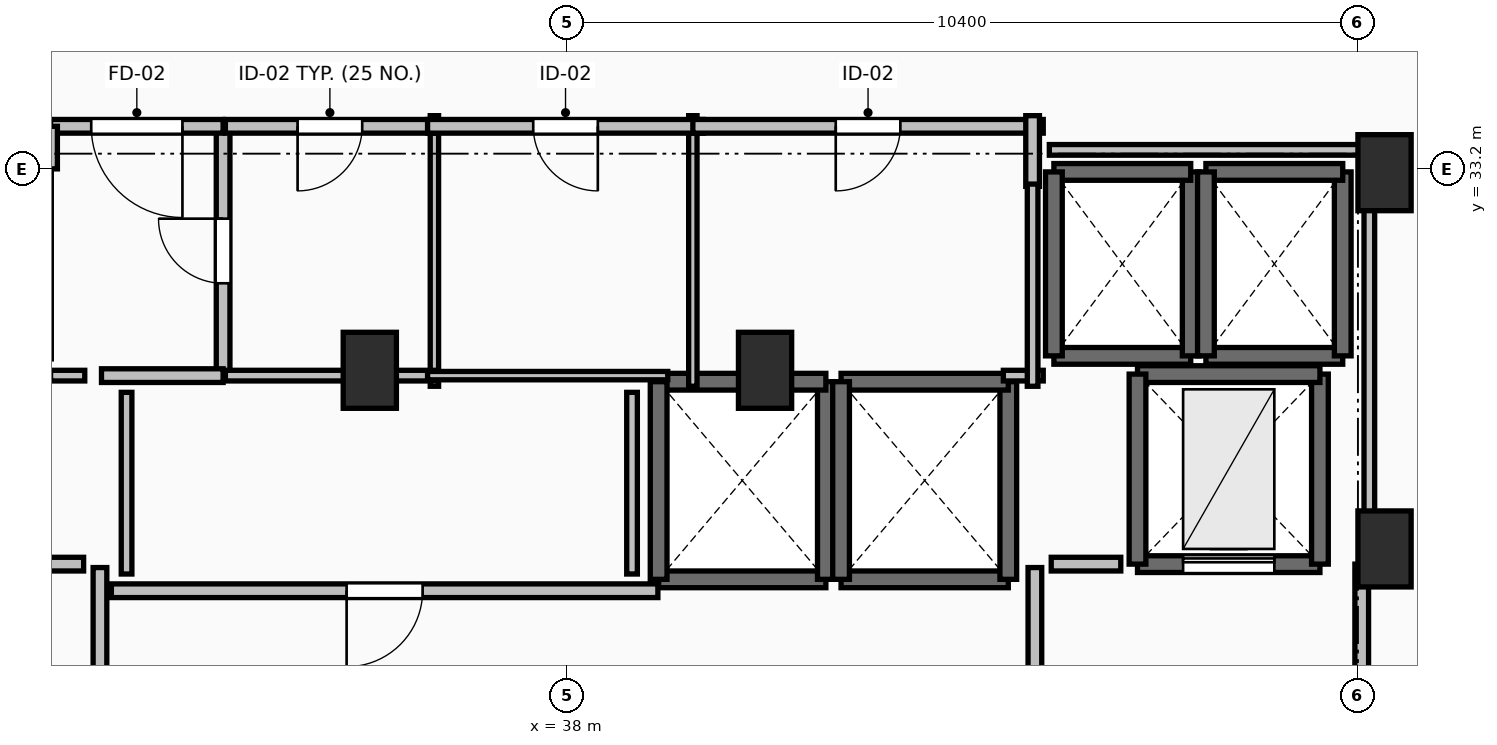
"""IFC4 building model, lengths in metres.
Left out: names, types, materials, properties, quantities, classifications, styles, units other than length and angle.
Written with IfcOpenShell. Run it as: python <this file> out.ifc"""

import sys

from ifc_helpers import new_model, si_unit, direction, frame, frame_2d, origin, origin_2d, place, context, subcontext, project, spatial, rectangle, extrude, element, fill, save


model = new_model("IFC4")
c1 = context("Model", 3, precision=1e-05, world=origin(), true_north=direction((0.0, 1.0)))
c2 = subcontext(c1, "Body", "Model", "MODEL_VIEW")
j1 = project(units=[si_unit("LENGTHUNIT", "METRE"), si_unit("PLANEANGLEUNIT", "RADIAN")], contexts=[c1])
p1 = place(None, origin())
s1 = spatial("IfcSite", under=j1, at=p1, CompositionType="ELEMENT")
p2 = place(p1, origin())
s2 = spatial("IfcBuilding", under=s1, at=p2, CompositionType="ELEMENT")
p3 = place(p2, frame((0.0, 0.0, 193.1)))
s3 = spatial("IfcBuildingStorey", under=s2, at=p3, CompositionType="ELEMENT", Elevation=193.1)
for number, where, z_axis, x_axis in (
    (1, (48.75, 33.15, 0.0), (0.0, 0.0, 1.0), (1.0, 0.0, 0.0)),
    (2, (48.75, 28.2, 0.0), (0.0, 0.0, 1.0), (1.0, 0.0, 0.0)),
    (3, (35.4, 30.55, 0.0), (0.0, 0.0, 1.0), (1.0, 0.0, 0.0)),
    (4, (40.6, 30.55, 0.0), (0.0, 0.0, 1.0), (1.0, 0.0, 0.0)),
):
    element("IfcColumn", number, at=place(p3, frame(where, z_axis=z_axis, x_axis=x_axis)), inside=s3, PredefinedType="PILASTER", context=c2, shape_type="SweptSolid", body=[
        extrude(rectangle(XDim=0.7, YDim=1.0, at=origin_2d()), origin(), (0.0, 0.0, 1.0), 3.5),
    ])
p4 = place(p3, frame((39.2, 27.8, 0.0), z_axis=(0.0, 0.0, 1.0), x_axis=(1.0, 0.0, 0.0)))
e5 = element("IfcWall", 5, at=p4, inside=s3, PredefinedType="SOLIDWALL", context=c2, shape_type="SweptSolid", body=[
    extrude(rectangle(XDim=2.2, YDim=0.22, at=frame_2d((1.1, 0.0))), origin(), (0.0, 0.0, 1.0), 3.24),
])
p5 = place(p3, frame((41.4, 27.8, 0.0), z_axis=(0.0, 0.0, 1.0), x_axis=(0.0, 1.0, 0.0)))
e6 = element("IfcWall", 6, at=p5, inside=s3, PredefinedType="SOLIDWALL", context=c2, shape_type="SweptSolid", body=[
    extrude(rectangle(XDim=2.6, YDim=0.22, at=frame_2d((1.3, 0.0))), origin(), (0.0, 0.0, 1.0), 3.24),
])
p6 = place(p3, frame((41.4, 30.4, 0.0), z_axis=(0.0, 0.0, 1.0), x_axis=(-1.0, 0.0, 0.0)))
e7 = element("IfcWall", 7, at=p6, inside=s3, PredefinedType="SOLIDWALL", context=c2, shape_type="SweptSolid", body=[
    extrude(rectangle(XDim=2.2, YDim=0.22, at=frame_2d((1.1, 0.0))), origin(), (0.0, 0.0, 1.0), 3.24),
])
p7 = place(p3, frame((39.2, 30.4, 0.0), z_axis=(0.0, 0.0, 1.0), x_axis=(0.0, -1.0, 0.0)))
e8 = element("IfcWall", 8, at=p7, inside=s3, PredefinedType="SOLIDWALL", context=c2, shape_type="SweptSolid", body=[
    extrude(rectangle(XDim=2.6, YDim=0.22, at=frame_2d((1.3, 0.0))), origin(), (0.0, 0.0, 1.0), 3.24),
])
p8 = place(p3, frame((41.6, 27.8, 0.0), z_axis=(0.0, 0.0, 1.0), x_axis=(1.0, 0.0, 0.0)))
e9 = element("IfcWall", 9, at=p8, inside=s3, PredefinedType="SOLIDWALL", context=c2, shape_type="SweptSolid", body=[
    extrude(rectangle(XDim=2.2, YDim=0.22, at=frame_2d((1.1, 0.0))), origin(), (0.0, 0.0, 1.0), 3.24),
])
p9 = place(p3, frame((43.8, 27.8, 0.0), z_axis=(0.0, 0.0, 1.0), x_axis=(0.0, 1.0, 0.0)))
e10 = element("IfcWall", 10, at=p9, inside=s3, PredefinedType="SOLIDWALL", context=c2, shape_type="SweptSolid", body=[
    extrude(rectangle(XDim=2.6, YDim=0.22, at=frame_2d((1.3, 0.0))), origin(), (0.0, 0.0, 1.0), 3.24),
])
p10 = place(p3, frame((43.8, 30.4, 0.0), z_axis=(0.0, 0.0, 1.0), x_axis=(-1.0, 0.0, 0.0)))
e11 = element("IfcWall", 11, at=p10, inside=s3, PredefinedType="SOLIDWALL", context=c2, shape_type="SweptSolid", body=[
    extrude(rectangle(XDim=2.2, YDim=0.22, at=frame_2d((1.1, 0.0))), origin(), (0.0, 0.0, 1.0), 3.24),
])
p11 = place(p3, frame((41.6, 30.4, 0.0), z_axis=(0.0, 0.0, 1.0), x_axis=(0.0, -1.0, 0.0)))
e12 = element("IfcWall", 12, at=p11, inside=s3, PredefinedType="SOLIDWALL", context=c2, shape_type="SweptSolid", body=[
    extrude(rectangle(XDim=2.6, YDim=0.22, at=frame_2d((1.3, 0.0))), origin(), (0.0, 0.0, 1.0), 3.24),
])
p12 = place(p3, frame((44.4, 30.74, 0.0), z_axis=(0.0, 0.0, 1.0), x_axis=(1.0, 0.0, 0.0)))
e13 = element("IfcWall", 13, at=p12, inside=s3, PredefinedType="SOLIDWALL", context=c2, shape_type="SweptSolid", body=[
    extrude(rectangle(XDim=1.8, YDim=0.22, at=frame_2d((0.9, 0.0))), origin(), (0.0, 0.0, 1.0), 3.24),
])
p13 = place(p3, frame((46.2, 30.74, 0.0), z_axis=(0.0, 0.0, 1.0), x_axis=(0.0, 1.0, 0.0)))
e14 = element("IfcWall", 14, at=p13, inside=s3, PredefinedType="SOLIDWALL", context=c2, shape_type="SweptSolid", body=[
    extrude(rectangle(XDim=2.42, YDim=0.22, at=frame_2d((1.21, 0.0))), origin(), (0.0, 0.0, 1.0), 3.24),
])
p14 = place(p3, frame((46.2, 33.16, 0.0), z_axis=(0.0, 0.0, 1.0), x_axis=(-1.0, 0.0, 0.0)))
e15 = element("IfcWall", 15, at=p14, inside=s3, PredefinedType="SOLIDWALL", context=c2, shape_type="SweptSolid", body=[
    extrude(rectangle(XDim=1.8, YDim=0.22, at=frame_2d((0.9, 0.0))), origin(), (0.0, 0.0, 1.0), 3.24),
])
p15 = place(p3, frame((44.4, 33.16, 0.0), z_axis=(0.0, 0.0, 1.0), x_axis=(0.0, -1.0, 0.0)))
e16 = element("IfcWall", 16, at=p15, inside=s3, PredefinedType="SOLIDWALL", context=c2, shape_type="SweptSolid", body=[
    extrude(rectangle(XDim=2.42, YDim=0.22, at=frame_2d((1.21, 0.0))), origin(), (0.0, 0.0, 1.0), 3.24),
])
p16 = place(p3, frame((46.4, 30.74, 0.0), z_axis=(0.0, 0.0, 1.0), x_axis=(1.0, 0.0, 0.0)))
e17 = element("IfcWall", 17, at=p16, inside=s3, PredefinedType="SOLIDWALL", context=c2, shape_type="SweptSolid", body=[
    extrude(rectangle(XDim=1.8, YDim=0.22, at=frame_2d((0.9, 0.0))), origin(), (0.0, 0.0, 1.0), 3.24),
])
p17 = place(p3, frame((48.2, 30.74, 0.0), z_axis=(0.0, 0.0, 1.0), x_axis=(0.0, 1.0, 0.0)))
e18 = element("IfcWall", 18, at=p17, inside=s3, PredefinedType="SOLIDWALL", context=c2, shape_type="SweptSolid", body=[
    extrude(rectangle(XDim=2.42, YDim=0.22, at=frame_2d((1.21, 0.0))), origin(), (0.0, 0.0, 1.0), 3.24),
])
p18 = place(p3, frame((48.2, 33.16, 0.0), z_axis=(0.0, 0.0, 1.0), x_axis=(-1.0, 0.0, 0.0)))
e19 = element("IfcWall", 19, at=p18, inside=s3, PredefinedType="SOLIDWALL", context=c2, shape_type="SweptSolid", body=[
    extrude(rectangle(XDim=1.8, YDim=0.22, at=frame_2d((0.9, 0.0))), origin(), (0.0, 0.0, 1.0), 3.24),
])
p19 = place(p3, frame((46.4, 33.16, 0.0), z_axis=(0.0, 0.0, 1.0), x_axis=(0.0, -1.0, 0.0)))
e20 = element("IfcWall", 20, at=p19, inside=s3, PredefinedType="SOLIDWALL", context=c2, shape_type="SweptSolid", body=[
    extrude(rectangle(XDim=2.42, YDim=0.22, at=frame_2d((1.21, 0.0))), origin(), (0.0, 0.0, 1.0), 3.24),
])
p20 = place(p3, frame((45.5, 28.0, 0.0), z_axis=(0.0, 0.0, 1.0), x_axis=(1.0, 0.0, 0.0)))
e21 = element("IfcWall", 21, at=p20, inside=s3, PredefinedType="SHEAR", context=c2, shape_type="SweptSolid", body=[
    extrude(rectangle(XDim=2.4, YDim=0.22, at=frame_2d((1.2, 0.0))), origin(), (0.0, 0.0, 1.0), 3.24),
])
p21 = place(p20, frame((0.6, 0.0, 0.0)))
e22 = element("IfcOpeningElement", 22, at=p21, cuts=e21, PredefinedType="OPENING", context=c2, shape_type="SweptSolid", body=[
    extrude(rectangle(XDim=1.2, YDim=2.2, at=frame_2d((0.6, 1.1))), frame((0.0, 0.125, 0.0), z_axis=(0.0, -1.0, 0.0), x_axis=(1.0, 0.0, 0.0)), (0.0, 0.0, 1.0), 0.25),
])
p22 = place(p3, frame((47.9, 28.0, 0.0), z_axis=(0.0, 0.0, 1.0), x_axis=(0.0, 1.0, 0.0)))
e23 = element("IfcWall", 23, at=p22, inside=s3, PredefinedType="SHEAR", context=c2, shape_type="SweptSolid", body=[
    extrude(rectangle(XDim=2.5, YDim=0.22, at=frame_2d((1.25, 0.0))), origin(), (0.0, 0.0, 1.0), 3.24),
])
p23 = place(p3, frame((47.9, 30.5, 0.0), z_axis=(0.0, 0.0, 1.0), x_axis=(-1.0, 0.0, 0.0)))
e24 = element("IfcWall", 24, at=p23, inside=s3, PredefinedType="SHEAR", context=c2, shape_type="SweptSolid", body=[
    extrude(rectangle(XDim=2.4, YDim=0.22, at=frame_2d((1.2, 0.0))), origin(), (0.0, 0.0, 1.0), 3.24),
])
p24 = place(p3, frame((45.5, 30.5, 0.0), z_axis=(0.0, 0.0, 1.0), x_axis=(0.0, -1.0, 0.0)))
e25 = element("IfcWall", 25, at=p24, inside=s3, PredefinedType="SHEAR", context=c2, shape_type="SweptSolid", body=[
    extrude(rectangle(XDim=2.5, YDim=0.22, at=frame_2d((1.25, 0.0))), origin(), (0.0, 0.0, 1.0), 3.24),
])
p25 = place(p3, frame((31.85, 24.045, 0.0), z_axis=(0.0, 0.0, 1.0), x_axis=(0.0, 1.0, 0.0)))
e26 = element("IfcWall", 26, at=p25, inside=s3, PredefinedType="PARTITIONING", context=c2, shape_type="SweptSolid", body=[
    extrude(rectangle(XDim=3.91, YDim=0.18, at=frame_2d((1.955, 0.0))), origin(), (0.0, 0.0, 1.0), 3.24),
])
p26 = place(p25, frame((1.355, 0.0, 0.0)))
e27 = element("IfcOpeningElement", 27, at=p26, cuts=e26, PredefinedType="OPENING", context=c2, shape_type="SweptSolid", body=[
    extrude(rectangle(XDim=1.2, YDim=2.15, at=frame_2d((0.6, 1.075))), frame((0.0, 0.105, 0.0), z_axis=(0.0, -1.0, 0.0), x_axis=(1.0, 0.0, 0.0)), (0.0, 0.0, 1.0), 0.21),
])
p27 = place(p3, frame((44.15, 27.955, 0.0), z_axis=(0.0, 0.0, 1.0), x_axis=(0.0, -1.0, 0.0)))
e28 = element("IfcWall", 28, at=p27, inside=s3, PredefinedType="PARTITIONING", context=c2, shape_type="SweptSolid", body=[
    extrude(rectangle(XDim=3.91, YDim=0.18, at=frame_2d((1.955, 0.0))), origin(), (0.0, 0.0, 1.0), 3.24),
])
p28 = place(p27, frame((1.355, 0.0, 0.0)))
e29 = element("IfcOpeningElement", 29, at=p28, cuts=e28, PredefinedType="OPENING", context=c2, shape_type="SweptSolid", body=[
    extrude(rectangle(XDim=1.2, YDim=2.15, at=frame_2d((0.6, 1.075))), frame((0.0, 0.105, 0.0), z_axis=(0.0, -1.0, 0.0), x_axis=(1.0, 0.0, 0.0)), (0.0, 0.0, 1.0), 0.21),
])
p29 = place(p3, frame((48.45, 23.95, 0.0), z_axis=(0.0, 0.0, 1.0), x_axis=(0.0, 1.0, 0.0)))
e30 = element("IfcWall", 30, at=p29, inside=s3, PredefinedType="PARTITIONING", context=c2, shape_type="SweptSolid", body=[
    extrude(rectangle(XDim=4.05, YDim=0.18, at=frame_2d((2.025, 0.0))), origin(), (0.0, 0.0, 1.0), 3.24),
])
p30 = place(p29, frame((1.425, 0.0, 0.0)))
e31 = element("IfcOpeningElement", 31, at=p30, cuts=e30, PredefinedType="OPENING", context=c2, shape_type="SweptSolid", body=[
    extrude(rectangle(XDim=1.2, YDim=2.15, at=frame_2d((0.6, 1.075))), frame((0.0, 0.105, 0.0), z_axis=(0.0, -1.0, 0.0), x_axis=(1.0, 0.0, 0.0)), (0.0, 0.0, 1.0), 0.21),
])
p31 = place(p3, frame((33.47, 30.48, 0.0), z_axis=(0.0, 0.0, 1.0), x_axis=(0.0, 1.0, 0.0)))
e32 = element("IfcWall", 32, at=p31, inside=s3, PredefinedType="PARTITIONING", context=c2, shape_type="SweptSolid", body=[
    extrude(rectangle(XDim=3.28, YDim=0.18, at=frame_2d((1.64, 0.0))), origin(), (0.0, 0.0, 1.0), 3.24),
])
p32 = place(p31, frame((1.215, 0.0, 0.0)))
e33 = element("IfcOpeningElement", 33, at=p32, cuts=e32, PredefinedType="OPENING", context=c2, shape_type="SweptSolid", body=[
    extrude(rectangle(XDim=0.85, YDim=2.1, at=frame_2d((0.425, 1.05))), frame((0.0, 0.105, 0.0), z_axis=(0.0, -1.0, 0.0), x_axis=(1.0, 0.0, 0.0)), (0.0, 0.0, 1.0), 0.21),
])
p33 = place(p3, frame((31.87, 30.48, 0.0), z_axis=(0.0, 0.0, 1.0), x_axis=(1.0, 0.0, 0.0)))
e34 = element("IfcWall", 34, at=p33, inside=s3, PredefinedType="PARTITIONING", context=c2, shape_type="SweptSolid", body=[
    extrude(rectangle(XDim=1.6, YDim=0.18, at=frame_2d((0.8, 0.0))), origin(), (0.0, 0.0, 1.0), 3.24),
])
p34 = place(p3, frame((33.47, 33.76, 0.0), z_axis=(0.0, 0.0, 1.0), x_axis=(-1.0, 0.0, 0.0)))
e35 = element("IfcWall", 35, at=p34, inside=s3, PredefinedType="PARTITIONING", context=c2, shape_type="SweptSolid", body=[
    extrude(rectangle(XDim=2.27, YDim=0.18, at=frame_2d((1.135, 0.0))), origin(), (0.0, 0.0, 1.0), 3.24),
])
p35 = place(p34, frame((0.535, 0.0, 0.0)))
e36 = element("IfcOpeningElement", 36, at=p35, cuts=e35, PredefinedType="OPENING", context=c2, shape_type="SweptSolid", body=[
    extrude(rectangle(XDim=1.2, YDim=2.15, at=frame_2d((0.6, 1.075))), frame((0.0, 0.105, 0.0), z_axis=(0.0, -1.0, 0.0), x_axis=(1.0, 0.0, 0.0)), (0.0, 0.0, 1.0), 0.21),
])
p36 = place(p3, frame((31.2, 33.76, 0.0), z_axis=(0.0, 0.0, 1.0), x_axis=(0.0, -1.0, 0.0)))
e37 = element("IfcWall", 37, at=p36, inside=s3, PredefinedType="PARTITIONING", context=c2, shape_type="SweptSolid", body=[
    extrude(rectangle(XDim=0.56, YDim=0.18, at=frame_2d((0.28, 0.0))), origin(), (0.0, 0.0, 1.0), 3.24),
])
p37 = place(p3, frame((39.19, 27.65, 0.0), z_axis=(0.0, 0.0, 1.0), x_axis=(-1.0, 0.0, 0.0)))
e38 = element("IfcWall", 38, at=p37, inside=s3, PredefinedType="PARTITIONING", context=c2, shape_type="SweptSolid", body=[
    extrude(rectangle(XDim=7.19, YDim=0.18, at=frame_2d((3.595, 0.0))), origin(), (0.0, 0.0, 1.0), 3.24),
])
p38 = place(p37, frame((3.095, 0.0, 0.0)))
e39 = element("IfcOpeningElement", 39, at=p38, cuts=e38, PredefinedType="OPENING", context=c2, shape_type="SweptSolid", body=[
    extrude(rectangle(XDim=1.0, YDim=2.15, at=frame_2d((0.5, 1.075))), frame((0.0, 0.105, 0.0), z_axis=(0.0, -1.0, 0.0), x_axis=(1.0, 0.0, 0.0)), (0.0, 0.0, 1.0), 0.21),
])
p39 = place(p3, frame((36.25, 30.34, 0.0), z_axis=(0.0, 0.0, 1.0), x_axis=(0.0, 1.0, 0.0)))
e40 = element("IfcWall", 40, at=p39, inside=s3, PredefinedType="PARTITIONING", context=c2, shape_type="SweptSolid", body=[
    extrude(rectangle(XDim=3.56, YDim=0.11, at=frame_2d((1.78, 0.0))), origin(), (0.0, 0.0, 1.0), 2.432),
])
p40 = place(p3, frame((33.5, 30.48, 0.0), z_axis=(0.0, 0.0, 1.0), x_axis=(1.0, 0.0, 0.0)))
e41 = element("IfcWall", 41, at=p40, inside=s3, PredefinedType="PARTITIONING", context=c2, shape_type="SweptSolid", body=[
    extrude(rectangle(XDim=2.75, YDim=0.14, at=frame_2d((1.375, 0.0))), origin(), (0.0, 0.0, 1.0), 2.432),
])
p41 = place(p3, frame((36.25, 33.76, 0.0), z_axis=(0.0, 0.0, 1.0), x_axis=(-1.0, 0.0, 0.0)))
e42 = element("IfcWall", 42, at=p41, inside=s3, PredefinedType="PARTITIONING", context=c2, shape_type="SweptSolid", body=[
    extrude(rectangle(XDim=2.75, YDim=0.18, at=frame_2d((1.375, 0.0))), origin(), (0.0, 0.0, 1.0), 3.24),
])
p42 = place(p41, frame((0.95, 0.0, 0.0)))
e43 = element("IfcOpeningElement", 43, at=p42, cuts=e42, PredefinedType="OPENING", context=c2, shape_type="SweptSolid", body=[
    extrude(rectangle(XDim=0.85, YDim=2.1, at=frame_2d((0.425, 1.05))), frame((0.0, 0.105, 0.0), z_axis=(0.0, -1.0, 0.0), x_axis=(1.0, 0.0, 0.0)), (0.0, 0.0, 1.0), 0.21),
])
p43 = place(p3, frame((39.65, 30.34, 0.0), z_axis=(0.0, 0.0, 1.0), x_axis=(0.0, 1.0, 0.0)))
e44 = element("IfcWall", 44, at=p43, inside=s3, PredefinedType="PARTITIONING", context=c2, shape_type="SweptSolid", body=[
    extrude(rectangle(XDim=3.56, YDim=0.11, at=frame_2d((1.78, 0.0))), origin(), (0.0, 0.0, 1.0), 2.432),
])
p44 = place(p3, frame((36.16, 30.48, 0.0), z_axis=(0.0, 0.0, 1.0), x_axis=(1.0, 0.0, 0.0)))
e45 = element("IfcWall", 45, at=p44, inside=s3, PredefinedType="PARTITIONING", context=c2, shape_type="SweptSolid", body=[
    extrude(rectangle(XDim=3.16, YDim=0.11, at=frame_2d((1.58, 0.0))), origin(), (0.0, 0.0, 1.0), 2.432),
])
p45 = place(p3, frame((39.79, 33.76, 0.0), z_axis=(0.0, 0.0, 1.0), x_axis=(-1.0, 0.0, 0.0)))
e46 = element("IfcWall", 46, at=p45, inside=s3, PredefinedType="PARTITIONING", context=c2, shape_type="SweptSolid", body=[
    extrude(rectangle(XDim=3.63, YDim=0.18, at=frame_2d((1.815, 0.0))), origin(), (0.0, 0.0, 1.0), 3.24),
])
p46 = place(p45, frame((1.39, 0.0, 0.0)))
e47 = element("IfcOpeningElement", 47, at=p46, cuts=e46, PredefinedType="OPENING", context=c2, shape_type="SweptSolid", body=[
    extrude(rectangle(XDim=0.85, YDim=2.1, at=frame_2d((0.425, 1.05))), frame((0.0, 0.105, 0.0), z_axis=(0.0, -1.0, 0.0), x_axis=(1.0, 0.0, 0.0)), (0.0, 0.0, 1.0), 0.21),
])
p47 = place(p3, frame((44.26, 33.76, 0.0), z_axis=(0.0, 0.0, 1.0), x_axis=(-1.0, 0.0, 0.0)))
e48 = element("IfcWall", 48, at=p47, inside=s3, PredefinedType="PARTITIONING", context=c2, shape_type="SweptSolid", body=[
    extrude(rectangle(XDim=4.61, YDim=0.18, at=frame_2d((2.305, 0.0))), origin(), (0.0, 0.0, 1.0), 3.24),
])
p48 = place(p47, frame((1.88, 0.0, 0.0)))
e49 = element("IfcOpeningElement", 49, at=p48, cuts=e48, PredefinedType="OPENING", context=c2, shape_type="SweptSolid", body=[
    extrude(rectangle(XDim=0.85, YDim=2.1, at=frame_2d((0.425, 1.05))), frame((0.0, 0.105, 0.0), z_axis=(0.0, -1.0, 0.0), x_axis=(1.0, 0.0, 0.0)), (0.0, 0.0, 1.0), 0.21),
])
p49 = place(p3, frame((44.12, 32.97, 0.0), z_axis=(0.0, 0.0, 1.0), x_axis=(0.0, 1.0, 0.0)))
e50 = element("IfcWall", 50, at=p49, inside=s3, PredefinedType="PARTITIONING", context=c2, shape_type="SweptSolid", body=[
    extrude(rectangle(XDim=0.93, YDim=0.18, at=frame_2d((0.465, 0.0))), origin(), (0.0, 0.0, 1.0), 3.24),
])
for number, where, z_axis, x_axis in (
    (51, (31.635, 28.0, 0.0), (0.0, 0.0, 1.0), (-1.0, 0.0, 0.0)),
    (52, (45.28, 28.0, 0.0), (0.0, 0.0, 1.0), (-1.0, 0.0, 0.0)),
):
    element("IfcWall", number, at=place(p3, frame(where, z_axis=z_axis, x_axis=x_axis)), inside=s3, PredefinedType="PARTITIONING", context=c2, shape_type="SweptSolid", body=[
        extrude(rectangle(XDim=0.915, YDim=0.18, at=frame_2d((0.458, 0.0))), origin(), (0.0, 0.0, 1.0), 3.24),
    ])
p50 = place(p3, frame((31.2, 30.48, 0.0), z_axis=(0.0, 0.0, 1.0), x_axis=(1.0, 0.0, 0.0)))
e53 = element("IfcWall", 53, at=p50, inside=s3, PredefinedType="PARTITIONING", context=c2, shape_type="SweptSolid", body=[
    extrude(rectangle(XDim=0.45, YDim=0.14, at=frame_2d((0.225, 0.0))), origin(), (0.0, 0.0, 1.0), 3.24),
])
p51 = place(p3, frame((43.735, 30.48, 0.0), z_axis=(0.0, 0.0, 1.0), x_axis=(1.0, 0.0, 0.0)))
e54 = element("IfcWall", 54, at=p51, inside=s3, PredefinedType="PARTITIONING", context=c2, shape_type="SweptSolid", body=[
    extrude(rectangle(XDim=0.525, YDim=0.14, at=frame_2d((0.262, 0.0))), origin(), (0.0, 0.0, 1.0), 3.24),
])
p52 = place(p3, frame((44.12, 30.34, 0.0), z_axis=(0.0, 0.0, 1.0), x_axis=(0.0, 1.0, 0.0)))
e55 = element("IfcWall", 55, at=p52, inside=s3, PredefinedType="PARTITIONING", context=c2, shape_type="SweptSolid", body=[
    extrude(rectangle(XDim=2.66, YDim=0.14, at=frame_2d((1.33, 0.0))), origin(), (0.0, 0.0, 1.0), 3.24),
])
for number, where, z_axis, x_axis in (
    (56, (32.2, 30.26, 0.0), (0.0, 0.0, 1.0), (0.0, -1.0, 0.0)),
    (57, (38.85, 27.87, 0.0), (0.0, 0.0, 1.0), (0.0, 1.0, 0.0)),
):
    element("IfcWall", number, at=place(p3, frame(where, z_axis=z_axis, x_axis=x_axis)), inside=s3, PredefinedType="PARTITIONING", context=c2, shape_type="SweptSolid", body=[
        extrude(rectangle(XDim=2.39, YDim=0.14, at=frame_2d((1.195, 0.0))), origin(), (0.0, 0.0, 1.0), 3.24),
    ])
p53 = place(p3, frame((48.55, 28.196, 0.0), z_axis=(0.0, 0.0, 1.0), x_axis=(0.0, 1.0, 0.0)))
e58 = element("IfcWall", 58, at=p53, inside=s3, PredefinedType="PARTITIONING", context=c2, shape_type="SweptSolid", body=[
    extrude(rectangle(XDim=5.254, YDim=0.14, at=frame_2d((2.627, 0.0))), origin(), (0.0, 0.0, 1.0), 2.432),
])
p54 = place(p3, frame((48.55, 33.45, 0.0), z_axis=(0.0, 0.0, 1.0), x_axis=(-1.0, 0.0, 0.0)))
e59 = element("IfcWall", 59, at=p54, inside=s3, PredefinedType="PARTITIONING", context=c2, shape_type="SweptSolid", body=[
    extrude(rectangle(XDim=4.21, YDim=0.14, at=frame_2d((2.105, 0.0))), origin(), (0.0, 0.0, 1.0), 2.432),
])
p55 = place(p21, origin())
e60 = element("IfcDoor", 60, at=p55, inside=s3, OperationType="SLIDING_TO_LEFT", PredefinedType="DOOR", context=c2, shape_type="SweptSolid", body=[
    extrude(rectangle(XDim=1.2, YDim=2.2, at=frame_2d((0.6, 1.1))), frame((0.0, 0.025, 0.0), z_axis=(0.0, -1.0, 0.0), x_axis=(1.0, 0.0, 0.0)), (0.0, 0.0, 1.0), 0.05),
])
fill(e22, e60)
p56 = place(p32, origin())
e61 = element("IfcDoor", 61, at=p56, inside=s3, OperationType="SINGLE_SWING_RIGHT", PredefinedType="DOOR", context=c2, shape_type="SweptSolid", body=[
    extrude(rectangle(XDim=0.85, YDim=2.1, at=frame_2d((0.425, 1.05))), frame((0.0, 0.025, 0.0), z_axis=(0.0, -1.0, 0.0), x_axis=(1.0, 0.0, 0.0)), (0.0, 0.0, 1.0), 0.05),
])
fill(e33, e61)
p57 = place(p35, origin())
e62 = element("IfcDoor", 62, at=p57, inside=s3, OperationType="SINGLE_SWING_LEFT", PredefinedType="DOOR", context=c2, shape_type="SweptSolid", body=[
    extrude(rectangle(XDim=1.2, YDim=2.15, at=frame_2d((0.6, 1.075))), frame((0.0, 0.025, 0.0), z_axis=(0.0, -1.0, 0.0), x_axis=(1.0, 0.0, 0.0)), (0.0, 0.0, 1.0), 0.05),
])
fill(e36, e62)
p58 = place(p38, origin())
e63 = element("IfcDoor", 63, at=p58, inside=s3, OperationType="SINGLE_SWING_RIGHT", PredefinedType="DOOR", context=c2, shape_type="SweptSolid", body=[
    extrude(rectangle(XDim=1.0, YDim=2.15, at=frame_2d((0.5, 1.075))), frame((0.0, 0.025, 0.0), z_axis=(0.0, -1.0, 0.0), x_axis=(1.0, 0.0, 0.0)), (0.0, 0.0, 1.0), 0.05),
])
fill(e39, e63)
p59 = place(p42, origin())
e64 = element("IfcDoor", 64, at=p59, inside=s3, OperationType="SINGLE_SWING_RIGHT", PredefinedType="DOOR", context=c2, shape_type="SweptSolid", body=[
    extrude(rectangle(XDim=0.85, YDim=2.1, at=frame_2d((0.425, 1.05))), frame((0.0, 0.025, 0.0), z_axis=(0.0, -1.0, 0.0), x_axis=(1.0, 0.0, 0.0)), (0.0, 0.0, 1.0), 0.05),
])
fill(e43, e64)
p60 = place(p46, origin())
e65 = element("IfcDoor", 65, at=p60, inside=s3, OperationType="SINGLE_SWING_LEFT", PredefinedType="DOOR", context=c2, shape_type="SweptSolid", body=[
    extrude(rectangle(XDim=0.85, YDim=2.1, at=frame_2d((0.425, 1.05))), frame((0.0, 0.025, 0.0), z_axis=(0.0, -1.0, 0.0), x_axis=(1.0, 0.0, 0.0)), (0.0, 0.0, 1.0), 0.05),
])
fill(e47, e65)
p61 = place(p48, origin())
e66 = element("IfcDoor", 66, at=p61, inside=s3, OperationType="SINGLE_SWING_RIGHT", PredefinedType="DOOR", context=c2, shape_type="SweptSolid", body=[
    extrude(rectangle(XDim=0.85, YDim=2.1, at=frame_2d((0.425, 1.05))), frame((0.0, 0.025, 0.0), z_axis=(0.0, -1.0, 0.0), x_axis=(1.0, 0.0, 0.0)), (0.0, 0.0, 1.0), 0.05),
])
fill(e49, e66)
save(model, sys.argv[1])
